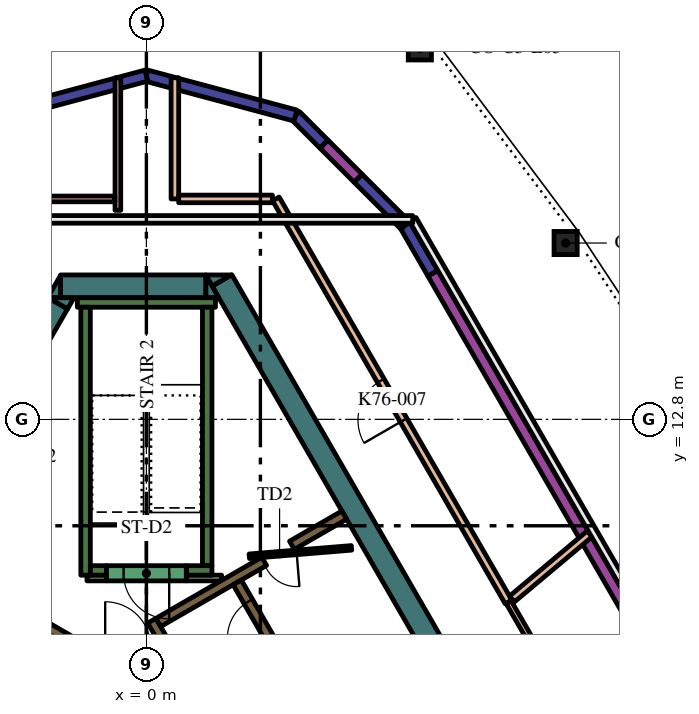
"""IFC4 building model, lengths in metres.
Left out: names, types, materials, properties, quantities, classifications, styles, units other than length and angle.
Written with IfcOpenShell. Run it as: python <this file> out.ifc"""

import sys

from ifc_helpers import new_model, si_unit, direction, frame, frame_2d, origin, origin_2d, place, context, subcontext, project, spatial, polyline, rectangle, hollow_circle, outline, extrude, element, fill, save


model = new_model("IFC4")
c1 = context("Model", 3, precision=1e-05, world=origin(), true_north=direction((0.0, 1.0)))
c2 = subcontext(c1, "Body", "Model", "MODEL_VIEW")
j1 = project(units=[si_unit("LENGTHUNIT", "METRE"), si_unit("PLANEANGLEUNIT", "RADIAN")], contexts=[c1])
p1 = place(None, origin())
s1 = spatial("IfcSite", under=j1, at=p1, CompositionType="ELEMENT")
p2 = place(p1, origin())
s2 = spatial("IfcBuilding", under=s1, at=p2, CompositionType="ELEMENT")
p3 = place(p2, frame((0.0, 0.0, 327.6)))
s3 = spatial("IfcBuildingStorey", under=s2, at=p3, CompositionType="ELEMENT", Elevation=327.6)
for number, where, z_axis, x_axis in (
    (1, (11.032, 17.44, 0.0), (0.0, 0.0, 1.0), (1.0, 0.0, 0.0)),
    (2, (7.195, 22.561, 0.0), (0.0, 0.0, 1.0), (1.0, 0.0, 0.0)),
):
    element("IfcColumn", number, at=place(p3, frame(where, z_axis=z_axis, x_axis=x_axis)), inside=s3, PredefinedType="COLUMN", context=c2, shape_type="SweptSolid", body=[
        extrude(hollow_circle(Radius=0.305, WallThickness=0.025, at=origin_2d()), origin(), (0.0, 0.0, 1.0), 4.2),
    ])
p4 = place(p3, frame((1.989, 16.456, 0.0), z_axis=(0.0, 0.0, 1.0), x_axis=(0.49999102663, -0.8660305845, 0.0)))
e3 = element("IfcWall", 3, at=p4, inside=s3, PredefinedType="SOLIDWALL", context=c2, shape_type="SweptSolid", body=[
    extrude(rectangle(XDim=12.406, YDim=0.6, at=frame_2d((6.203, 0.0))), origin(), (0.0, 0.0, 1.0), 4.2),
])
p5 = place(p3, origin())
e4 = element("IfcWall", 4, at=p5, inside=s3, PredefinedType="SOLIDWALL", context=c2, shape_type="SweptSolid", body=[
    extrude(outline(polyline([(1.559, 16.6), (2.235, 16.6), (1.728, 16.307), (1.559, 16.6)])), origin(), (0.0, 0.0, 1.0), 4.2),
])
p6 = place(p3, frame((-2.258, 16.3, 0.0), z_axis=(0.0, 0.0, 1.0), x_axis=(1.0, 0.0, 0.0)))
e5 = element("IfcWall", 5, at=p6, inside=s3, PredefinedType="SOLIDWALL", context=c2, shape_type="SweptSolid", body=[
    extrude(rectangle(XDim=3.823, YDim=0.6, at=frame_2d((1.912, 0.0))), origin(), (0.0, 0.0, 1.0), 4.2),
])
e6 = element("IfcWall", 6, at=p5, inside=s3, PredefinedType="SOLIDWALL", context=c2, shape_type="SweptSolid", body=[
    extrude(outline(polyline([(1.905, 16.0), (1.567, 16.0), (1.567, 16.585), (1.905, 16.0)])), origin(), (0.0, 0.0, 1.0), 4.2),
])
e7 = element("IfcWall", 7, at=p5, inside=s3, PredefinedType="SOLIDWALL", context=c2, shape_type="SweptSolid", body=[
    extrude(outline(polyline([(-2.598, 16.0), (-2.26, 16.585), (-2.26, 16.0), (-2.598, 16.0)])), origin(), (0.0, 0.0, 1.0), 4.2),
])
p7 = place(p3, frame((-2.335, 15.855, 0.0), z_axis=(0.0, 0.0, 1.0), x_axis=(-0.499960127962, -0.866048422692, 0.0)))
e8 = element("IfcWall", 8, at=p7, inside=s3, PredefinedType="SOLIDWALL", context=c2, shape_type="SweptSolid", body=[
    extrude(rectangle(XDim=2.934, YDim=0.6, at=frame_2d((1.467, 0.0))), origin(), (0.0, 0.0, 1.0), 4.2),
])
e9 = element("IfcWall", 9, at=p5, inside=s3, PredefinedType="SOLIDWALL", context=c2, shape_type="SweptSolid", body=[
    extrude(outline(polyline([(-1.905, 16.0), (-2.074, 15.707), (-2.581, 16.0), (-1.905, 16.0)])), origin(), (0.0, 0.0, 1.0), 4.2),
])
p8 = place(p3, frame((-1.817, 15.875, 0.0), z_axis=(0.0, 0.0, 1.0), x_axis=(1.0, 0.0, 0.0)))
e10 = element("IfcWall", 10, at=p8, inside=s3, PredefinedType="SOLIDWALL", context=c2, shape_type="SweptSolid", body=[
    extrude(rectangle(XDim=3.634, YDim=0.25, at=frame_2d((1.817, 0.0))), origin(), (0.0, 0.0, 1.0), 4.2),
])
p9 = place(p3, frame((1.6, 8.95, 0.0), z_axis=(0.0, 0.0, 1.0), x_axis=(0.0, 1.0, 0.0)))
e11 = element("IfcWall", 11, at=p9, inside=s3, PredefinedType="SOLIDWALL", context=c2, shape_type="SweptSolid", body=[
    extrude(rectangle(XDim=6.8, YDim=0.25, at=frame_2d((3.4, 0.0))), origin(), (0.0, 0.0, 1.0), 4.2),
])
p10 = place(p3, frame((1.05, 8.825, 0.0), z_axis=(0.0, 0.0, 1.0), x_axis=(1.0, 0.0, 0.0)))
e12 = element("IfcWall", 12, at=p10, inside=s3, PredefinedType="SOLIDWALL", context=c2, shape_type="SweptSolid", body=[
    extrude(rectangle(XDim=0.675, YDim=0.25, at=frame_2d((0.337, 0.0))), origin(), (0.0, 0.0, 1.0), 4.2),
])
p11 = place(p3, frame((-1.6, 8.7, 0.0), z_axis=(0.0, 0.0, 1.0), x_axis=(0.0, 1.0, 0.0)))
e13 = element("IfcWall", 13, at=p11, inside=s3, PredefinedType="SOLIDWALL", context=c2, shape_type="SweptSolid", body=[
    extrude(rectangle(XDim=7.05, YDim=0.25, at=frame_2d((3.525, 0.0))), origin(), (0.0, 0.0, 1.0), 4.2),
])
p12 = place(p3, frame((-1.475, 8.825, 0.0), z_axis=(0.0, 0.0, 1.0), x_axis=(1.0, 0.0, 0.0)))
e14 = element("IfcWall", 14, at=p12, inside=s3, PredefinedType="SOLIDWALL", context=c2, shape_type="SweptSolid", body=[
    extrude(rectangle(XDim=0.425, YDim=0.25, at=frame_2d((0.212, 0.0))), origin(), (0.0, 0.0, 1.0), 4.2),
])
p13 = place(p3, frame((0.417, 7.027, 0.0), z_axis=(0.0, 0.0, 1.0), x_axis=(-0.500210807569, 0.865903659763, 0.0)))
e15 = element("IfcWall", 15, at=p13, inside=s3, PredefinedType="SOLIDWALL", context=c2, shape_type="SweptSolid", body=[
    extrude(rectangle(XDim=0.548, YDim=0.25, at=frame_2d((0.274, 0.0))), origin(), (0.0, 0.0, 1.0), 4.2),
])
p14 = place(p3, frame((3.1, 9.064, 0.0), z_axis=(0.0, 0.0, 1.0), x_axis=(-0.866030133475, -0.499991807846, 0.0)))
e16 = element("IfcWall", 16, at=p14, inside=s3, PredefinedType="SOLIDWALL", context=c2, shape_type="SweptSolid", body=[
    extrude(rectangle(XDim=3.217, YDim=0.25, at=frame_2d((1.608, 0.0))), origin(), (0.0, 0.0, 1.0), 4.2),
])
p15 = place(p3, frame((3.83, 9.486, 0.0), z_axis=(0.0, 0.0, 1.0), x_axis=(0.865986202621, 0.500067892261, 0.0)))
e17 = element("IfcWall", 17, at=p15, inside=s3, PredefinedType="SOLIDWALL", context=c2, shape_type="SweptSolid", body=[
    extrude(rectangle(XDim=1.591, YDim=0.25, at=frame_2d((0.795, 0.0))), origin(), (0.0, 0.0, 1.0), 4.2),
])
p16 = place(p3, frame((-1.76, 6.836, 0.0), z_axis=(0.0, 0.0, 1.0), x_axis=(-0.865952863304, 0.500125622755, 0.0)))
e18 = element("IfcWall", 18, at=p16, inside=s3, PredefinedType="SOLIDWALL", context=c2, shape_type="SweptSolid", body=[
    extrude(rectangle(XDim=1.258, YDim=0.25, at=frame_2d((0.629, 0.0))), origin(), (0.0, 0.0, 1.0), 4.2),
])
p17 = place(p3, frame((1.05, 8.625, 0.0), z_axis=(0.0, 0.0, 1.0), x_axis=(1.0, 0.0, 0.0)))
e19 = element("IfcWall", 19, at=p17, inside=s3, PredefinedType="PARTITIONING", context=c2, shape_type="SweptSolid", body=[
    extrude(rectangle(XDim=0.929, YDim=0.15, at=frame_2d((0.464, 0.0))), origin(), (0.0, 0.0, 1.0), 3.45),
])
p18 = place(p3, frame((-1.564, 8.625, 0.0), z_axis=(0.0, 0.0, 1.0), x_axis=(1.0, 0.0, 0.0)))
e20 = element("IfcWall", 20, at=p18, inside=s3, PredefinedType="PARTITIONING", context=c2, shape_type="SweptSolid", body=[
    extrude(rectangle(XDim=0.514, YDim=0.15, at=frame_2d((0.257, 0.0))), origin(), (0.0, 0.0, 1.0), 3.45),
])
p19 = place(p3, frame((8.565, -2.185, 0.0), z_axis=(0.0, 0.0, 1.0), x_axis=(-0.499997954832, 0.866026584559, 0.0)))
e21 = element("IfcWall", 21, at=p19, inside=s3, PredefinedType="SOLIDWALL", context=c2, shape_type="SweptSolid", body=[
    extrude(rectangle(XDim=12.35, YDim=0.25, at=frame_2d((6.175, 0.0))), origin(), (0.0, 0.0, 1.0), 4.2),
])
p20 = place(p19, frame((0.685, 0.0, 0.0)))
e22 = element("IfcOpeningElement", 22, at=p20, cuts=e21, PredefinedType="OPENING", context=c2, shape_type="SweptSolid", body=[
    extrude(rectangle(XDim=0.9, YDim=2.1, at=frame_2d((0.45, 1.05))), frame((0.0, 0.135, 0.0), z_axis=(0.0, -1.0, 0.0), x_axis=(1.0, 0.0, 0.0)), (0.0, 0.0, 1.0), 0.27),
])
p21 = place(p19, frame((3.105, 0.0, 0.0)))
e23 = element("IfcOpeningElement", 23, at=p21, cuts=e21, PredefinedType="OPENING", context=c2, shape_type="SweptSolid", body=[
    extrude(rectangle(XDim=1.1, YDim=2.1, at=frame_2d((0.55, 1.05))), frame((0.0, 0.135, 0.0), z_axis=(0.0, -1.0, 0.0), x_axis=(1.0, 0.0, 0.0)), (0.0, 0.0, 1.0), 0.27),
])
p22 = place(p19, frame((5.625, 0.0, 0.0)))
e24 = element("IfcOpeningElement", 24, at=p22, cuts=e21, PredefinedType="OPENING", context=c2, shape_type="SweptSolid", body=[
    extrude(rectangle(XDim=1.1, YDim=2.1, at=frame_2d((0.55, 1.05))), frame((0.0, 0.135, 0.0), z_axis=(0.0, -1.0, 0.0), x_axis=(1.0, 0.0, 0.0)), (0.0, 0.0, 1.0), 0.27),
])
p23 = place(p19, frame((8.145, 0.0, 0.0)))
e25 = element("IfcOpeningElement", 25, at=p23, cuts=e21, PredefinedType="OPENING", context=c2, shape_type="SweptSolid", body=[
    extrude(rectangle(XDim=1.1, YDim=2.1, at=frame_2d((0.55, 1.05))), frame((0.0, 0.135, 0.0), z_axis=(0.0, -1.0, 0.0), x_axis=(1.0, 0.0, 0.0)), (0.0, 0.0, 1.0), 0.27),
])
p24 = place(p19, frame((10.665, 0.0, 0.0)))
e26 = element("IfcOpeningElement", 26, at=p24, cuts=e21, PredefinedType="OPENING", context=c2, shape_type="SweptSolid", body=[
    extrude(rectangle(XDim=1.1, YDim=2.1, at=frame_2d((0.55, 1.05))), frame((0.0, 0.135, 0.0), z_axis=(0.0, -1.0, 0.0), x_axis=(1.0, 0.0, 0.0)), (0.0, 0.0, 1.0), 0.27),
])
p25 = place(p3, frame((1.05, 8.75, 0.0), z_axis=(0.0, 0.0, 1.0), x_axis=(-1.0, 0.0, 0.0)))
e27 = element("IfcWall", 27, at=p25, inside=s3, PredefinedType="SOLIDWALL", context=c2, shape_type="SweptSolid", body=[
    extrude(rectangle(XDim=2.1, YDim=0.4, at=frame_2d((1.05, 0.0))), origin(), (0.0, 0.0, 1.0), 4.2),
])
p26 = place(p25, frame((0.45, 0.0, 0.0)))
e28 = element("IfcOpeningElement", 28, at=p26, cuts=e27, PredefinedType="OPENING", context=c2, shape_type="SweptSolid", body=[
    extrude(rectangle(XDim=1.2, YDim=2.1, at=frame_2d((0.6, 1.05))), frame((0.0, 0.21, 0.0), z_axis=(0.0, -1.0, 0.0), x_axis=(1.0, 0.0, 0.0)), (0.0, 0.0, 1.0), 0.42),
])
p27 = place(p3, frame((5.398, 9.419, 0.0), z_axis=(0.0, 0.0, 1.0), x_axis=(-0.996653416376, -0.081743303248, 0.0)))
e29 = element("IfcWall", 29, at=p27, inside=s3, PredefinedType="PARTITIONING", context=c2, shape_type="SweptSolid", body=[
    extrude(rectangle(XDim=2.7, YDim=0.12, at=frame_2d((1.35, 0.0))), origin(), (0.0, 0.0, 1.0), 3.45),
])
p28 = place(p27, frame((1.45, 0.0, 0.0)))
e30 = element("IfcOpeningElement", 30, at=p28, cuts=e29, PredefinedType="OPENING", context=c2, shape_type="SweptSolid", body=[
    extrude(rectangle(XDim=0.9, YDim=2.1, at=frame_2d((0.45, 1.05))), frame((0.0, 0.07, 0.0), z_axis=(0.0, -1.0, 0.0), x_axis=(1.0, 0.0, 0.0)), (0.0, 0.0, 1.0), 0.14),
])
p29 = place(p3, frame((9.529, 7.995, 0.0), z_axis=(0.0, 0.0, 1.0), x_axis=(-0.499979608858, 0.866037176296, 0.0)))
e31 = element("IfcWall", 31, at=p29, inside=s3, PredefinedType="PARTITIONING", context=c2, shape_type="SweptSolid", body=[
    extrude(rectangle(XDim=12.245, YDim=0.2, at=frame_2d((6.123, 0.0))), origin(), (0.0, 0.0, 1.0), 3.45),
])
p30 = place(p29, frame((5.522, 0.0, 0.0)))
e32 = element("IfcOpeningElement", 32, at=p30, cuts=e31, PredefinedType="OPENING", context=c2, shape_type="SweptSolid", body=[
    extrude(rectangle(XDim=1.2, YDim=2.1, at=frame_2d((0.6, 1.05))), frame((0.0, 0.11, 0.0), z_axis=(0.0, -1.0, 0.0), x_axis=(1.0, 0.0, 0.0)), (0.0, 0.0, 1.0), 0.22),
])
p31 = place(p3, frame((14.145, -0.0, 0.0), z_axis=(0.0, 0.0, 1.0), x_axis=(-0.500008111839, 0.866020720362, 0.0)))
e33 = element("IfcWall", 33, at=p31, inside=s3, PredefinedType="PARTITIONING", context=c2, shape_type="SweptSolid", body=[
    extrude(rectangle(XDim=9.223, YDim=0.15, at=frame_2d((4.611, 0.0))), origin(), (0.0, 0.0, 1.0), 3.45),
])
p32 = place(p31, frame((3.711, 0.0, 0.0)))
e34 = element("IfcOpeningElement", 34, at=p32, cuts=e33, PredefinedType="OPENING", context=c2, shape_type="SweptSolid", body=[
    extrude(rectangle(XDim=1.8, YDim=2.1, at=frame_2d((0.9, 1.05))), frame((0.0, 0.085, 0.0), z_axis=(0.0, -1.0, 0.0), x_axis=(1.0, 0.0, 0.0)), (0.0, 0.0, 1.0), 0.17),
])
p33 = place(p3, frame((0.75, 21.789, 0.0), z_axis=(0.0, 0.0, 1.0), x_axis=(0.0, -1.0, 0.0)))
e35 = element("IfcWall", 35, at=p33, inside=s3, PredefinedType="PARTITIONING", context=c2, shape_type="SweptSolid", body=[
    extrude(rectangle(XDim=3.188, YDim=0.2, at=frame_2d((1.594, 0.0))), origin(), (0.0, 0.0, 1.0), 3.45),
])
p34 = place(p3, frame((-0.75, 18.3, 0.0), z_axis=(0.0, 0.0, 1.0), x_axis=(0.0, 1.0, 0.0)))
e36 = element("IfcWall", 36, at=p34, inside=s3, PredefinedType="PARTITIONING", context=c2, shape_type="SweptSolid", body=[
    extrude(rectangle(XDim=3.489, YDim=0.15, at=frame_2d((1.744, 0.0))), origin(), (0.0, 0.0, 1.0), 3.45),
])
p35 = place(p3, frame((-3.336, 18.6, 0.0), z_axis=(0.0, 0.0, 1.0), x_axis=(1.0, 0.0, 0.0)))
e37 = element("IfcWall", 37, at=p35, inside=s3, PredefinedType="PARTITIONING", context=c2, shape_type="SweptSolid", body=[
    extrude(rectangle(XDim=2.506, YDim=0.15, at=frame_2d((1.253, 0.0))), origin(), (0.0, 0.0, 1.0), 3.45),
])
p36 = place(p3, frame((0.85, 18.6, 0.0), z_axis=(0.0, 0.0, 1.0), x_axis=(1.0, 0.0, 0.0)))
e38 = element("IfcWall", 38, at=p36, inside=s3, PredefinedType="PARTITIONING", context=c2, shape_type="SweptSolid", body=[
    extrude(rectangle(XDim=2.466, YDim=0.2, at=frame_2d((1.233, 0.0))), origin(), (0.0, 0.0, 1.0), 3.45),
])
p37 = place(p3, frame((9.621, 8.073, 0.0), z_axis=(0.0, 0.0, 1.0), x_axis=(0.766049084948, 0.64278207773, 0.0)))
e39 = element("IfcWall", 39, at=p37, inside=s3, PredefinedType="PARTITIONING", context=c2, shape_type="SweptSolid", body=[
    extrude(rectangle(XDim=2.668, YDim=0.2, at=frame_2d((1.334, 0.0))), origin(), (0.0, 0.0, 1.0), 3.45),
])
p38 = place(p3, frame((18.181, -1.79, 0.0), z_axis=(0.0, 0.0, 1.0), x_axis=(-0.500002158106, 0.866024157798, 0.0)))
e40 = element("IfcWall", 40, at=p38, inside=s3, PredefinedType="SOLIDWALL", context=c2, shape_type="SweptSolid", body=[
    extrude(rectangle(XDim=21.282, YDim=0.3, at=frame_2d((10.641, 0.0))), origin(), (0.0, 0.0, 1.0), 3.45),
])
p39 = place(p3, frame((7.54, 16.64, 0.0), z_axis=(0.0, 0.0, 1.0), x_axis=(-0.499977492351, 0.866038398192, 0.0)))
e41 = element("IfcWall", 41, at=p39, inside=s3, PredefinedType="SOLIDWALL", context=c2, shape_type="SweptSolid", body=[
    extrude(rectangle(XDim=1.464, YDim=0.3, at=frame_2d((0.732, 0.0))), origin(), (0.0, 0.0, 1.0), 3.95),
])
p40 = place(p3, frame((6.808, 17.908, 0.0), z_axis=(0.0, 0.0, 1.0), x_axis=(-0.707106781187, 0.707106781187, 0.0)))
e42 = element("IfcWall", 42, at=p40, inside=s3, PredefinedType="SOLIDWALL", context=c2, shape_type="SweptSolid", body=[
    extrude(rectangle(XDim=1.752, YDim=0.3, at=frame_2d((0.876, 0.0))), origin(), (0.0, 0.0, 1.0), 3.95),
])
p41 = place(p3, frame((5.569, 19.147, 0.0), z_axis=(0.0, 0.0, 1.0), x_axis=(-0.707106781187, 0.707106781187, 0.0)))
e43 = element("IfcWall", 43, at=p41, inside=s3, PredefinedType="SOLIDWALL", context=c2, shape_type="SweptSolid", body=[
    extrude(rectangle(XDim=1.264, YDim=0.3, at=frame_2d((0.632, 0.0))), origin(), (0.0, 0.0, 1.0), 3.45),
])
p42 = place(p3, frame((4.675, 20.041, 0.0), z_axis=(0.0, 0.0, 1.0), x_axis=(-0.707106781187, 0.707106781187, 0.0)))
e44 = element("IfcWall", 44, at=p42, inside=s3, PredefinedType="SOLIDWALL", context=c2, shape_type="SweptSolid", body=[
    extrude(rectangle(XDim=1.065, YDim=0.3, at=frame_2d((0.532, 0.0))), origin(), (0.0, 0.0, 1.0), 3.95),
])
for number, where, z_axis, x_axis in (
    (45, (3.922, 20.794, 0.0), (0.0, 0.0, 1.0), (-0.966, 0.259, 0.0)),
    (46, (0.0, 21.845, 0.0), (0.0, 0.0, 1.0), (-0.966, -0.259, 0.0)),
):
    element("IfcWall", number, at=place(p3, frame(where, z_axis=z_axis, x_axis=x_axis)), inside=s3, PredefinedType="SOLIDWALL", context=c2, shape_type="SweptSolid", body=[
        extrude(rectangle(XDim=4.061, YDim=0.3, at=frame_2d((2.03, 0.0))), origin(), (0.0, 0.0, 1.0), 3.95),
    ])
p43 = place(p24, origin())
e47 = element("IfcDoor", 47, at=p43, inside=s3, OperationType="DOUBLE_DOOR_SLIDING", PredefinedType="DOOR", context=c2, shape_type="SweptSolid", body=[
    extrude(rectangle(XDim=1.1, YDim=2.1, at=frame_2d((0.55, 1.05))), frame((0.0, 0.025, 0.0), z_axis=(0.0, -1.0, 0.0), x_axis=(1.0, 0.0, 0.0)), (0.0, 0.0, 1.0), 0.05),
])
fill(e26, e47)
p44 = place(p26, origin())
e48 = element("IfcDoor", 48, at=p44, inside=s3, OperationType="SINGLE_SWING_LEFT", PredefinedType="DOOR", context=c2, shape_type="SweptSolid", body=[
    extrude(rectangle(XDim=1.2, YDim=2.1, at=frame_2d((0.6, 1.05))), frame((0.0, 0.025, 0.0), z_axis=(0.0, -1.0, 0.0), x_axis=(1.0, 0.0, 0.0)), (0.0, 0.0, 1.0), 0.05),
])
fill(e28, e48)
p45 = place(p28, origin())
e49 = element("IfcDoor", 49, at=p45, inside=s3, OperationType="SINGLE_SWING_LEFT", PredefinedType="DOOR", context=c2, shape_type="SweptSolid", body=[
    extrude(rectangle(XDim=0.9, YDim=2.1, at=frame_2d((0.45, 1.05))), frame((0.0, 0.025, 0.0), z_axis=(0.0, -1.0, 0.0), x_axis=(1.0, 0.0, 0.0)), (0.0, 0.0, 1.0), 0.05),
])
fill(e30, e49)
p46 = place(p30, origin())
e50 = element("IfcDoor", 50, at=p46, inside=s3, OperationType="SINGLE_SWING_RIGHT", PredefinedType="DOOR", context=c2, shape_type="SweptSolid", body=[
    extrude(rectangle(XDim=1.2, YDim=2.1, at=frame_2d((0.6, 1.05))), frame((0.0, 0.025, 0.0), z_axis=(0.0, -1.0, 0.0), x_axis=(1.0, 0.0, 0.0)), (0.0, 0.0, 1.0), 0.05),
])
fill(e32, e50)
save(model, sys.argv[1])
